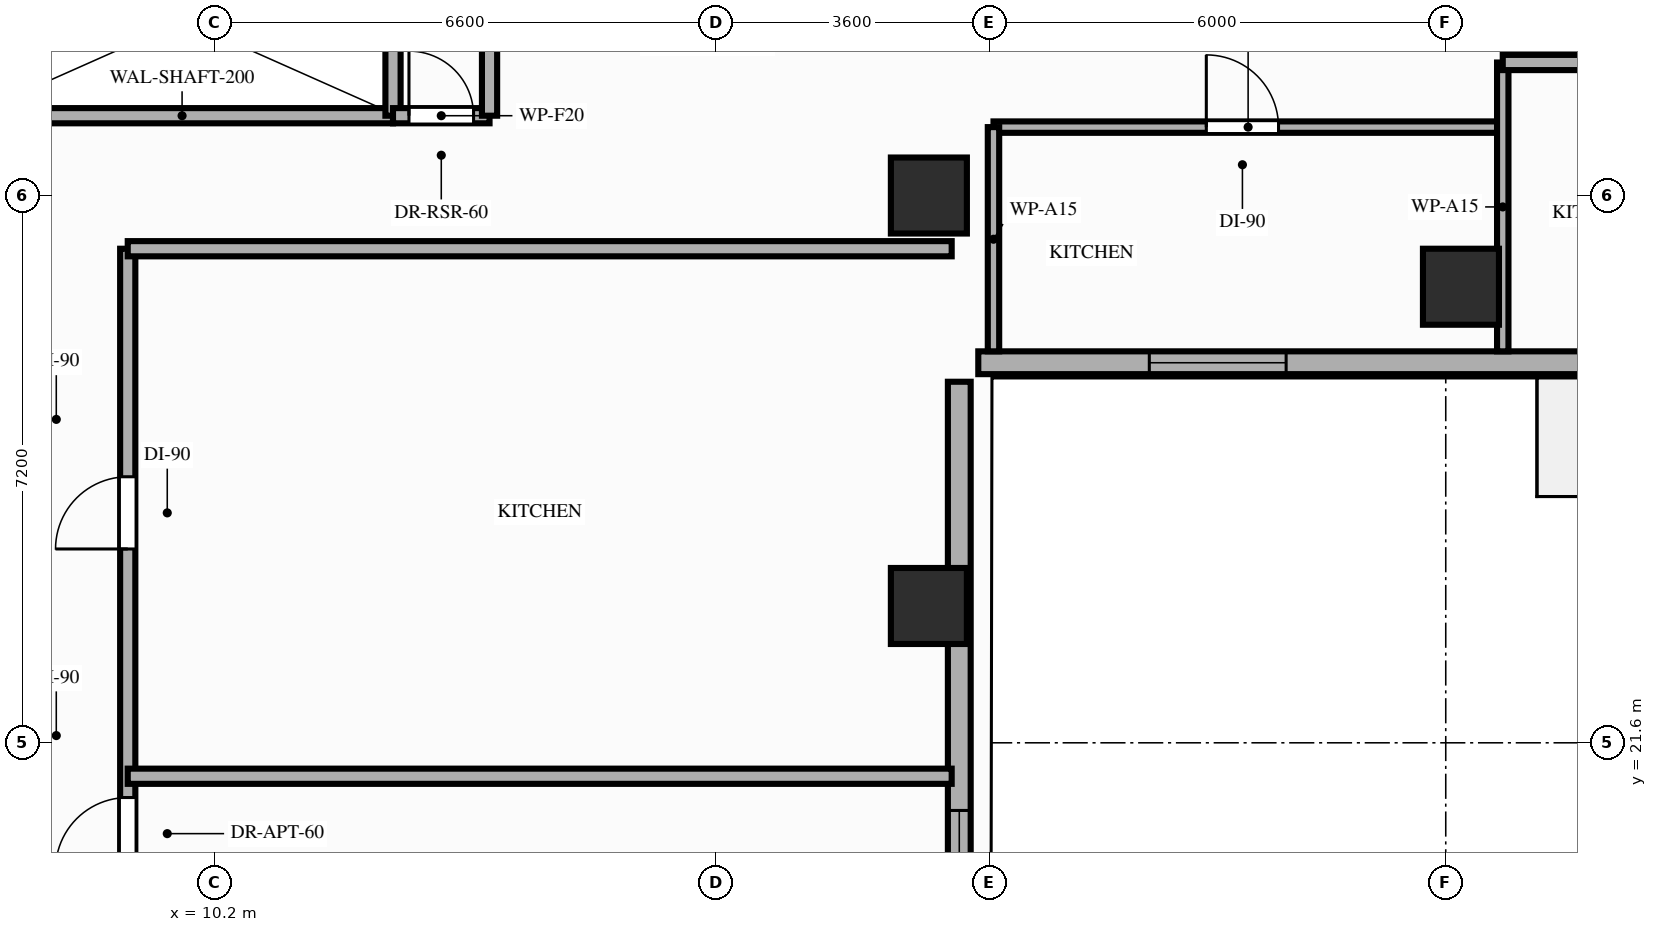
"""IFC4 building model, lengths in metres.
Left out: names, types, materials, properties, quantities, classifications, styles, units other than length and angle.
Written with IfcOpenShell. Run it as: python <this file> out.ifc"""

import sys

from ifc_helpers import new_model, si_unit, direction, frame, frame_2d, origin, origin_2d, place, context, subcontext, project, spatial, rectangle, extrude, element, fill, save


model = new_model("IFC4")
c1 = context("Model", 3, precision=1e-05, world=origin(), true_north=direction((0.0, 1.0)))
c2 = subcontext(c1, "Body", "Model", "MODEL_VIEW")
j1 = project(units=[si_unit("LENGTHUNIT", "METRE"), si_unit("PLANEANGLEUNIT", "RADIAN")], contexts=[c1])
p1 = place(None, origin())
s1 = spatial("IfcSite", under=j1, at=p1, CompositionType="ELEMENT")
p2 = place(p1, origin())
s2 = spatial("IfcBuilding", under=s1, at=p2, CompositionType="ELEMENT")
p3 = place(p2, frame((0.0, 0.0, 139.4)))
s3 = spatial("IfcBuildingStorey", under=s2, at=p3, CompositionType="ELEMENT", Elevation=139.4)
for number, where, z_axis, x_axis in (
    (1, (19.6, 23.4, 0.0), (0.0, 0.0, 1.0), (1.0, 0.0, 0.0)),
    (2, (19.6, 28.8, 0.0), (0.0, 0.0, 1.0), (1.0, 0.0, 0.0)),
    (3, (26.6, 27.6, 0.0), (0.0, 0.0, 1.0), (1.0, 0.0, 0.0)),
):
    element("IfcColumn", number, at=place(p3, frame(where, z_axis=z_axis, x_axis=x_axis)), inside=s3, PredefinedType="COLUMN", context=c2, shape_type="SweptSolid", body=[
        extrude(rectangle(XDim=1.0, YDim=1.0, at=origin_2d()), origin(), (0.0, 0.0, 1.0), 3.2),
    ])
p4 = place(p3, frame((20.0, 8.8, 0.0), z_axis=(0.0, 0.0, 1.0), x_axis=(0.0, 1.0, 0.0)))
e4 = element("IfcWall", 4, at=p4, inside=s3, PredefinedType="STANDARD", context=c2, shape_type="SweptSolid", body=[
    extrude(rectangle(XDim=17.55, YDim=0.3, at=frame_2d((8.775, 0.0))), origin(), (0.0, 0.0, 1.0), 2.45),
])
p5 = place(p4, frame((10.11, 0.0, 0.85)))
e5 = element("IfcOpeningElement", 5, at=p5, cuts=e4, PredefinedType="OPENING", context=c2, shape_type="SweptSolid", body=[
    extrude(rectangle(XDim=1.8, YDim=1.35, at=frame_2d((0.9, 0.675))), frame((0.0, 0.16, 0.0), z_axis=(0.0, -1.0, 0.0), x_axis=(1.0, 0.0, 0.0)), (0.0, 0.0, 1.0), 0.32),
])
p6 = place(p4, frame((5.95, 0.0, 0.85)))
e6 = element("IfcOpeningElement", 6, at=p6, cuts=e4, PredefinedType="OPENING", context=c2, shape_type="SweptSolid", body=[
    extrude(rectangle(XDim=1.1, YDim=1.35, at=frame_2d((0.55, 0.675))), frame((0.0, 0.16, 0.0), z_axis=(0.0, -1.0, 0.0), x_axis=(1.0, 0.0, 0.0)), (0.0, 0.0, 1.0), 0.32),
])
p7 = place(p3, frame((20.25, 26.6, 0.0), z_axis=(0.0, 0.0, 1.0), x_axis=(1.0, 0.0, 0.0)))
e7 = element("IfcWall", 7, at=p7, inside=s3, PredefinedType="STANDARD", context=c2, shape_type="SweptSolid", body=[
    extrude(rectangle(XDim=26.15, YDim=0.3, at=frame_2d((13.075, 0.0))), origin(), (0.0, 0.0, 1.0), 2.71),
])
p8 = place(p7, frame((7.95, 0.0, 0.0)))
e8 = element("IfcOpeningElement", 8, at=p8, cuts=e7, PredefinedType="OPENING", context=c2, shape_type="SweptSolid", body=[
    extrude(rectangle(XDim=1.4, YDim=2.1, at=frame_2d((0.7, 1.05))), frame((0.0, 0.16, 0.0), z_axis=(0.0, -1.0, 0.0), x_axis=(1.0, 0.0, 0.0)), (0.0, 0.0, 1.0), 0.32),
])
p9 = place(p7, frame((22.45, 0.0, 0.0)))
e9 = element("IfcOpeningElement", 9, at=p9, cuts=e7, PredefinedType="OPENING", context=c2, shape_type="SweptSolid", body=[
    extrude(rectangle(XDim=1.4, YDim=2.1, at=frame_2d((0.7, 1.05))), frame((0.0, 0.16, 0.0), z_axis=(0.0, -1.0, 0.0), x_axis=(1.0, 0.0, 0.0)), (0.0, 0.0, 1.0), 0.32),
])
p10 = place(p7, frame((2.25, 0.0, 0.85)))
e10 = element("IfcOpeningElement", 10, at=p10, cuts=e7, PredefinedType="OPENING", context=c2, shape_type="SweptSolid", body=[
    extrude(rectangle(XDim=1.8, YDim=1.61, at=frame_2d((0.9, 0.805))), frame((0.0, 0.16, 0.0), z_axis=(0.0, -1.0, 0.0), x_axis=(1.0, 0.0, 0.0)), (0.0, 0.0, 1.0), 0.32),
])
p11 = place(p7, frame((13.84, 0.0, 0.85)))
e11 = element("IfcOpeningElement", 11, at=p11, cuts=e7, PredefinedType="OPENING", context=c2, shape_type="SweptSolid", body=[
    extrude(rectangle(XDim=1.8, YDim=1.61, at=frame_2d((0.9, 0.805))), frame((0.0, 0.16, 0.0), z_axis=(0.0, -1.0, 0.0), x_axis=(1.0, 0.0, 0.0)), (0.0, 0.0, 1.0), 0.32),
])
p12 = place(p3, frame((7.0, 29.85, 0.0), z_axis=(0.0, 0.0, 1.0), x_axis=(1.0, 0.0, 0.0)))
e12 = element("IfcWall", 12, at=p12, inside=s3, PredefinedType="MOVABLE", context=c2, shape_type="SweptSolid", body=[
    extrude(rectangle(XDim=5.55, YDim=0.2, at=frame_2d((2.775, 0.0))), origin(), (0.0, 0.0, 1.0), 3.02),
])
p13 = place(p3, frame((12.55, 29.85, 0.0), z_axis=(0.0, 0.0, 1.0), x_axis=(0.0, 1.0, 0.0)))
e13 = element("IfcWall", 13, at=p13, inside=s3, PredefinedType="MOVABLE", context=c2, shape_type="SweptSolid", body=[
    extrude(rectangle(XDim=2.5, YDim=0.2, at=frame_2d((1.25, 0.0))), origin(), (0.0, 0.0, 1.0), 3.02),
])
p14 = place(p3, frame((12.55, 29.85, 0.0), z_axis=(0.0, 0.0, 1.0), x_axis=(1.0, 0.0, 0.0)))
e14 = element("IfcWall", 14, at=p14, inside=s3, PredefinedType="PARTITIONING", context=c2, shape_type="SweptSolid", body=[
    extrude(rectangle(XDim=1.27, YDim=0.2, at=frame_2d((0.635, 0.0))), origin(), (0.0, 0.0, 1.0), 3.02),
])
p15 = place(p14, frame((0.21, 0.0, 0.0)))
e15 = element("IfcOpeningElement", 15, at=p15, cuts=e14, PredefinedType="OPENING", context=c2, shape_type="SweptSolid", body=[
    extrude(rectangle(XDim=0.85, YDim=2.05, at=frame_2d((0.425, 1.025))), frame((0.0, 0.11, 0.0), z_axis=(0.0, -1.0, 0.0), x_axis=(1.0, 0.0, 0.0)), (0.0, 0.0, 1.0), 0.22),
])
p16 = place(p3, frame((13.82, 29.85, 0.0), z_axis=(0.0, 0.0, 1.0), x_axis=(0.0, 1.0, 0.0)))
e16 = element("IfcWall", 16, at=p16, inside=s3, PredefinedType="PARTITIONING", context=c2, shape_type="SweptSolid", body=[
    extrude(rectangle(XDim=2.5, YDim=0.2, at=frame_2d((1.25, 0.0))), origin(), (0.0, 0.0, 1.0), 3.02),
])
p17 = place(p3, frame((9.06, 14.5, 0.0), z_axis=(0.0, 0.0, 1.0), x_axis=(0.0, 1.0, 0.0)))
e17 = element("IfcWall", 17, at=p17, inside=s3, PredefinedType="PARTITIONING", context=c2, shape_type="SweptSolid", body=[
    extrude(rectangle(XDim=13.6, YDim=0.2, at=frame_2d((6.8, 0.0))), origin(), (0.0, 0.0, 1.0), 2.45),
])
p18 = place(p17, frame((0.45, 0.0, 0.0)))
e18 = element("IfcOpeningElement", 18, at=p18, cuts=e17, PredefinedType="OPENING", context=c2, shape_type="SweptSolid", body=[
    extrude(rectangle(XDim=0.95, YDim=2.15, at=frame_2d((0.475, 1.075))), frame((0.0, 0.11, 0.0), z_axis=(0.0, -1.0, 0.0), x_axis=(1.0, 0.0, 0.0)), (0.0, 0.0, 1.0), 0.22),
])
p19 = place(p17, frame((2.08, 0.0, 0.0)))
e19 = element("IfcOpeningElement", 19, at=p19, cuts=e17, PredefinedType="OPENING", context=c2, shape_type="SweptSolid", body=[
    extrude(rectangle(XDim=0.95, YDim=2.1, at=frame_2d((0.475, 1.05))), frame((0.0, 0.11, 0.0), z_axis=(0.0, -1.0, 0.0), x_axis=(1.0, 0.0, 0.0)), (0.0, 0.0, 1.0), 0.22),
])
p20 = place(p17, frame((9.65, 0.0, 0.0)))
e20 = element("IfcOpeningElement", 20, at=p20, cuts=e17, PredefinedType="OPENING", context=c2, shape_type="SweptSolid", body=[
    extrude(rectangle(XDim=0.95, YDim=2.15, at=frame_2d((0.475, 1.075))), frame((0.0, 0.11, 0.0), z_axis=(0.0, -1.0, 0.0), x_axis=(1.0, 0.0, 0.0)), (0.0, 0.0, 1.0), 0.22),
])
p21 = place(p17, frame((5.43, 0.0, 0.0)))
e21 = element("IfcOpeningElement", 21, at=p21, cuts=e17, PredefinedType="OPENING", context=c2, shape_type="SweptSolid", body=[
    extrude(rectangle(XDim=0.95, YDim=2.15, at=frame_2d((0.475, 1.075))), frame((0.0, 0.11, 0.0), z_axis=(0.0, -1.0, 0.0), x_axis=(1.0, 0.0, 0.0)), (0.0, 0.0, 1.0), 0.22),
])
p22 = place(p3, frame((9.06, 28.1, 0.0), z_axis=(0.0, 0.0, 1.0), x_axis=(1.0, 0.0, 0.0)))
e22 = element("IfcWall", 22, at=p22, inside=s3, PredefinedType="PARTITIONING", context=c2, shape_type="SweptSolid", body=[
    extrude(rectangle(XDim=10.84, YDim=0.2, at=frame_2d((5.42, 0.0))), origin(), (0.0, 0.0, 1.0), 2.45),
])
p23 = place(p3, frame((20.45, 29.7, 0.0), z_axis=(0.0, 0.0, 1.0), x_axis=(1.0, 0.0, 0.0)))
e23 = element("IfcWall", 23, at=p23, inside=s3, PredefinedType="PARTITIONING", context=c2, shape_type="SweptSolid", body=[
    extrude(rectangle(XDim=6.7, YDim=0.15, at=frame_2d((3.35, 0.0))), origin(), (0.0, 0.0, 1.0), 3.02),
])
p24 = place(p23, frame((2.8, 0.0, 0.0)))
e24 = element("IfcOpeningElement", 24, at=p24, cuts=e23, PredefinedType="OPENING", context=c2, shape_type="SweptSolid", body=[
    extrude(rectangle(XDim=0.95, YDim=2.15, at=frame_2d((0.475, 1.075))), frame((0.0, 0.085, 0.0), z_axis=(0.0, -1.0, 0.0), x_axis=(1.0, 0.0, 0.0)), (0.0, 0.0, 1.0), 0.17),
])
p25 = place(p3, frame((20.45, 26.75, 0.0), z_axis=(0.0, 0.0, 1.0), x_axis=(0.0, 1.0, 0.0)))
e25 = element("IfcWall", 25, at=p25, inside=s3, PredefinedType="PARTITIONING", context=c2, shape_type="SweptSolid", body=[
    extrude(rectangle(XDim=2.95, YDim=0.15, at=frame_2d((1.475, 0.0))), origin(), (0.0, 0.0, 1.0), 2.45),
])
p26 = place(p3, frame((27.15, 26.75, 0.0), z_axis=(0.0, 0.0, 1.0), x_axis=(0.0, 1.0, 0.0)))
e26 = element("IfcWall", 26, at=p26, inside=s3, PredefinedType="PARTITIONING", context=c2, shape_type="SweptSolid", body=[
    extrude(rectangle(XDim=3.8, YDim=0.15, at=frame_2d((1.9, 0.0))), origin(), (0.0, 0.0, 1.0), 2.45),
])
p27 = place(p3, frame((9.06, 21.16, 0.0), z_axis=(0.0, 0.0, 1.0), x_axis=(1.0, 0.0, 0.0)))
e27 = element("IfcWall", 27, at=p27, inside=s3, PredefinedType="PARTITIONING", context=c2, shape_type="SweptSolid", body=[
    extrude(rectangle(XDim=10.84, YDim=0.2, at=frame_2d((5.42, 0.0))), origin(), (0.0, 0.0, 1.0), 2.45),
])
p28 = place(p3, frame((27.15, 30.55, 0.0), z_axis=(0.0, 0.0, 1.0), x_axis=(1.0, 0.0, 0.0)))
e28 = element("IfcWall", 28, at=p28, inside=s3, PredefinedType="PARTITIONING", context=c2, shape_type="SweptSolid", body=[
    extrude(rectangle(XDim=14.55, YDim=0.2, at=frame_2d((7.275, 0.0))), origin(), (0.0, 0.0, 1.0), 2.45),
])
p29 = place(p28, frame((1.05, 0.0, 0.0)))
e29 = element("IfcOpeningElement", 29, at=p29, cuts=e28, PredefinedType="OPENING", context=c2, shape_type="SweptSolid", body=[
    extrude(rectangle(XDim=0.95, YDim=2.15, at=frame_2d((0.475, 1.075))), frame((0.0, 0.11, 0.0), z_axis=(0.0, -1.0, 0.0), x_axis=(1.0, 0.0, 0.0)), (0.0, 0.0, 1.0), 0.22),
])
p30 = place(p28, frame((4.4, 0.0, 0.0)))
e30 = element("IfcOpeningElement", 30, at=p30, cuts=e28, PredefinedType="OPENING", context=c2, shape_type="SweptSolid", body=[
    extrude(rectangle(XDim=0.95, YDim=2.15, at=frame_2d((0.475, 1.075))), frame((0.0, 0.11, 0.0), z_axis=(0.0, -1.0, 0.0), x_axis=(1.0, 0.0, 0.0)), (0.0, 0.0, 1.0), 0.22),
])
p31 = place(p28, frame((8.32, 0.0, 0.0)))
e31 = element("IfcOpeningElement", 31, at=p31, cuts=e28, PredefinedType="OPENING", context=c2, shape_type="SweptSolid", body=[
    extrude(rectangle(XDim=0.95, YDim=2.15, at=frame_2d((0.475, 1.075))), frame((0.0, 0.11, 0.0), z_axis=(0.0, -1.0, 0.0), x_axis=(1.0, 0.0, 0.0)), (0.0, 0.0, 1.0), 0.22),
])
p32 = place(p28, frame((12.25, 0.0, 0.0)))
e32 = element("IfcOpeningElement", 32, at=p32, cuts=e28, PredefinedType="OPENING", context=c2, shape_type="SweptSolid", body=[
    extrude(rectangle(XDim=0.95, YDim=2.15, at=frame_2d((0.475, 1.075))), frame((0.0, 0.11, 0.0), z_axis=(0.0, -1.0, 0.0), x_axis=(1.0, 0.0, 0.0)), (0.0, 0.0, 1.0), 0.22),
])
p33 = place(p5, origin())
e33 = element("IfcWindow", 33, at=p33, inside=s3, PartitioningType="SINGLE_PANEL", PredefinedType="WINDOW", context=c2, shape_type="SweptSolid", body=[
    extrude(rectangle(XDim=1.8, YDim=1.35, at=frame_2d((0.9, 0.675))), frame((0.0, 0.03, 0.0), z_axis=(0.0, -1.0, 0.0), x_axis=(1.0, 0.0, 0.0)), (0.0, 0.0, 1.0), 0.06),
])
fill(e5, e33)
p34 = place(p10, origin())
e34 = element("IfcWindow", 34, at=p34, inside=s3, PartitioningType="SINGLE_PANEL", PredefinedType="WINDOW", context=c2, shape_type="SweptSolid", body=[
    extrude(rectangle(XDim=1.8, YDim=1.61, at=frame_2d((0.9, 0.805))), frame((0.0, 0.03, 0.0), z_axis=(0.0, -1.0, 0.0), x_axis=(1.0, 0.0, 0.0)), (0.0, 0.0, 1.0), 0.06),
])
fill(e10, e34)
p35 = place(p15, origin())
e35 = element("IfcDoor", 35, at=p35, inside=s3, OperationType="SINGLE_SWING_LEFT", PredefinedType="DOOR", context=c2, shape_type="SweptSolid", body=[
    extrude(rectangle(XDim=0.85, YDim=2.05, at=frame_2d((0.425, 1.025))), frame((0.0, 0.025, 0.0), z_axis=(0.0, -1.0, 0.0), x_axis=(1.0, 0.0, 0.0)), (0.0, 0.0, 1.0), 0.05),
])
fill(e15, e35)
p36 = place(p24, origin())
e36 = element("IfcDoor", 36, at=p36, inside=s3, OperationType="SINGLE_SWING_LEFT", PredefinedType="DOOR", context=c2, shape_type="SweptSolid", body=[
    extrude(rectangle(XDim=0.95, YDim=2.15, at=frame_2d((0.475, 1.075))), frame((0.0, 0.025, 0.0), z_axis=(0.0, -1.0, 0.0), x_axis=(1.0, 0.0, 0.0)), (0.0, 0.0, 1.0), 0.05),
])
fill(e24, e36)
p37 = place(p20, origin())
e37 = element("IfcDoor", 37, at=p37, inside=s3, OperationType="SINGLE_SWING_LEFT", PredefinedType="DOOR", context=c2, shape_type="SweptSolid", body=[
    extrude(rectangle(XDim=0.95, YDim=2.15, at=frame_2d((0.475, 1.075))), frame((0.0, 0.025, 0.0), z_axis=(0.0, -1.0, 0.0), x_axis=(1.0, 0.0, 0.0)), (0.0, 0.0, 1.0), 0.05),
])
fill(e20, e37)
p38 = place(p21, origin())
e38 = element("IfcDoor", 38, at=p38, inside=s3, OperationType="SINGLE_SWING_LEFT", PredefinedType="DOOR", context=c2, shape_type="SweptSolid", body=[
    extrude(rectangle(XDim=0.95, YDim=2.15, at=frame_2d((0.475, 1.075))), frame((0.0, 0.025, 0.0), z_axis=(0.0, -1.0, 0.0), x_axis=(1.0, 0.0, 0.0)), (0.0, 0.0, 1.0), 0.05),
])
fill(e21, e38)
save(model, sys.argv[1])
